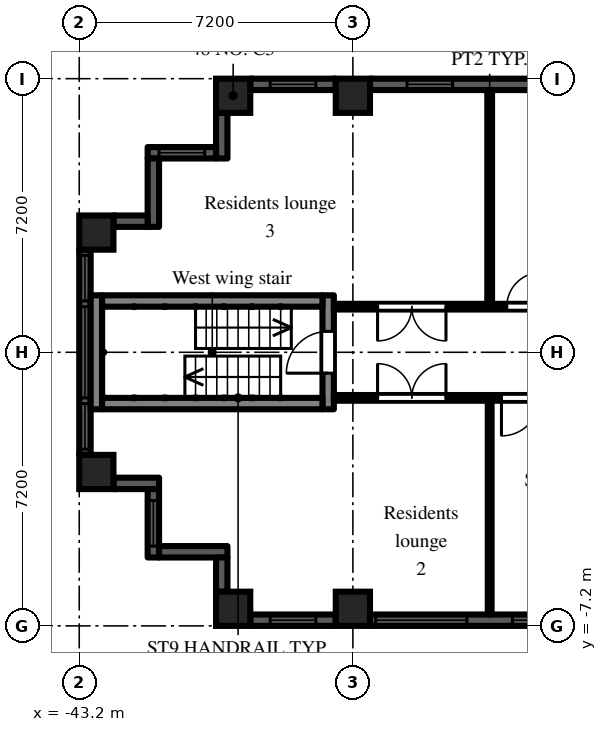
"""IFC4 building model, lengths in metres.
Left out: names, types, materials, properties, quantities, classifications, styles, units other than length and angle.
Written with IfcOpenShell. Run it as: python <this file> out.ifc"""

import sys

from ifc_helpers import new_model, si_unit, direction, frame, frame_2d, origin, origin_2d, place, context, subcontext, project, spatial, rectangle, extrude, element, fill, save


model = new_model("IFC4")
c1 = context("Model", 3, precision=1e-05, world=origin(), true_north=direction((0.0, 1.0)))
c2 = subcontext(c1, "Body", "Model", "MODEL_VIEW")
j1 = project(units=[si_unit("LENGTHUNIT", "METRE"), si_unit("PLANEANGLEUNIT", "RADIAN")], contexts=[c1])
p1 = place(None, origin())
s1 = spatial("IfcSite", under=j1, at=p1, CompositionType="ELEMENT")
p2 = place(p1, origin())
s2 = spatial("IfcBuilding", under=s1, at=p2, CompositionType="ELEMENT")
p3 = place(p2, frame((0.0, 0.0, 75.9)))
s3 = spatial("IfcBuildingStorey", under=s2, at=p3, CompositionType="ELEMENT", Elevation=75.9)
for number, where, z_axis, x_axis in (
    (1, (-42.75, -3.15, 0.0), (0.0, 0.0, 1.0), (1.0, 0.0, 0.0)),
    (2, (-42.75, 3.15, 0.0), (0.0, 0.0, 1.0), (1.0, 0.0, 0.0)),
    (3, (-39.15, -6.75, 0.0), (0.0, 0.0, 1.0), (1.0, 0.0, 0.0)),
    (4, (-39.15, 6.75, 0.0), (0.0, 0.0, 1.0), (1.0, 0.0, 0.0)),
    (5, (-36.0, -6.75, 0.0), (0.0, 0.0, 1.0), (1.0, 0.0, 0.0)),
    (6, (-36.0, 6.75, 0.0), (0.0, 0.0, 1.0), (1.0, 0.0, 0.0)),
):
    element("IfcColumn", number, at=place(p3, frame(where, z_axis=z_axis, x_axis=x_axis)), inside=s3, PredefinedType="COLUMN", context=c2, shape_type="SweptSolid", body=[
        extrude(rectangle(XDim=0.9, YDim=0.9, at=origin_2d()), origin(), (0.0, 0.0, 1.0), 3.0),
    ])
p4 = place(p3, frame((-29.25, 7.05, 0.0), z_axis=(0.0, 0.0, 1.0), x_axis=(-1.0, 0.0, 0.0)))
e7 = element("IfcWall", 7, at=p4, inside=s3, PredefinedType="SOLIDWALL", context=c2, shape_type="SweptSolid", body=[
    extrude(rectangle(XDim=6.3, YDim=0.3, at=frame_2d((3.15, 0.0))), origin(), (0.0, 0.0, 1.0), 2.1),
])
p5 = place(p4, frame((4.125, 0.0, 0.2)))
e8 = element("IfcOpeningElement", 8, at=p5, cuts=e7, PredefinedType="OPENING", context=c2, shape_type="SweptSolid", body=[
    extrude(rectangle(XDim=1.2, YDim=1.85, at=frame_2d((0.6, 0.925))), frame((0.0, 0.16, 0.0), z_axis=(0.0, -1.0, 0.0), x_axis=(1.0, 0.0, 0.0)), (0.0, 0.0, 1.0), 0.32),
])
p6 = place(p3, frame((-36.45, 7.05, 0.0), z_axis=(0.0, 0.0, 1.0), x_axis=(-1.0, 0.0, 0.0)))
e9 = element("IfcWall", 9, at=p6, inside=s3, PredefinedType="SOLIDWALL", context=c2, shape_type="SweptSolid", body=[
    extrude(rectangle(XDim=2.25, YDim=0.3, at=frame_2d((1.125, 0.0))), origin(), (0.0, 0.0, 1.0), 2.1),
])
p7 = place(p6, frame((0.525, 0.0, 0.2)))
e10 = element("IfcOpeningElement", 10, at=p7, cuts=e9, PredefinedType="OPENING", context=c2, shape_type="SweptSolid", body=[
    extrude(rectangle(XDim=1.2, YDim=1.85, at=frame_2d((0.6, 0.925))), frame((0.0, 0.16, 0.0), z_axis=(0.0, -1.0, 0.0), x_axis=(1.0, 0.0, 0.0)), (0.0, 0.0, 1.0), 0.32),
])
p8 = place(p3, frame((-39.45, 6.3, 0.0), z_axis=(0.0, 0.0, 1.0), x_axis=(0.0, -1.0, 0.0)))
e11 = element("IfcWall", 11, at=p8, inside=s3, PredefinedType="SOLIDWALL", context=c2, shape_type="SweptSolid", body=[
    extrude(rectangle(XDim=1.2, YDim=0.3, at=frame_2d((0.6, 0.0))), origin(), (0.0, 0.0, 1.0), 2.575),
])
p9 = place(p3, frame((-39.6, 5.25, 0.0), z_axis=(0.0, 0.0, 1.0), x_axis=(-1.0, 0.0, 0.0)))
e12 = element("IfcWall", 12, at=p9, inside=s3, PredefinedType="SOLIDWALL", context=c2, shape_type="SweptSolid", body=[
    extrude(rectangle(XDim=1.8, YDim=0.3, at=frame_2d((0.9, 0.0))), origin(), (0.0, 0.0, 1.0), 2.575),
])
p10 = place(p9, frame((0.3, 0.0, 0.2)))
e13 = element("IfcOpeningElement", 13, at=p10, cuts=e12, PredefinedType="OPENING", context=c2, shape_type="SweptSolid", body=[
    extrude(rectangle(XDim=1.2, YDim=1.85, at=frame_2d((0.6, 0.925))), frame((0.0, 0.16, 0.0), z_axis=(0.0, -1.0, 0.0), x_axis=(1.0, 0.0, 0.0)), (0.0, 0.0, 1.0), 0.32),
])
p11 = place(p3, frame((-41.25, 5.1, 0.0), z_axis=(0.0, 0.0, 1.0), x_axis=(0.0, -1.0, 0.0)))
e14 = element("IfcWall", 14, at=p11, inside=s3, PredefinedType="SOLIDWALL", context=c2, shape_type="SweptSolid", body=[
    extrude(rectangle(XDim=1.8, YDim=0.3, at=frame_2d((0.9, 0.0))), origin(), (0.0, 0.0, 1.0), 2.575),
])
p12 = place(p3, frame((-41.4, 3.45, 0.0), z_axis=(0.0, 0.0, 1.0), x_axis=(-1.0, 0.0, 0.0)))
e15 = element("IfcWall", 15, at=p12, inside=s3, PredefinedType="SOLIDWALL", context=c2, shape_type="SweptSolid", body=[
    extrude(rectangle(XDim=0.9, YDim=0.3, at=frame_2d((0.45, 0.0))), origin(), (0.0, 0.0, 1.0), 2.575),
])
p13 = place(p3, frame((-43.05, 2.7, 0.0), z_axis=(0.0, 0.0, 1.0), x_axis=(0.0, -1.0, 0.0)))
e16 = element("IfcWall", 16, at=p13, inside=s3, PredefinedType="SOLIDWALL", context=c2, shape_type="SweptSolid", body=[
    extrude(rectangle(XDim=5.4, YDim=0.3, at=frame_2d((2.7, 0.0))), origin(), (0.0, 0.0, 1.0), 2.1),
])
p14 = place(p13, frame((1.5, 0.0, 0.2)))
e17 = element("IfcOpeningElement", 17, at=p14, cuts=e16, PredefinedType="OPENING", context=c2, shape_type="SweptSolid", body=[
    extrude(rectangle(XDim=2.4, YDim=1.85, at=frame_2d((1.2, 0.925))), frame((0.0, 0.16, 0.0), z_axis=(0.0, -1.0, 0.0), x_axis=(1.0, 0.0, 0.0)), (0.0, 0.0, 1.0), 0.32),
])
p15 = place(p13, frame((0.15, 0.0, 0.2)))
e18 = element("IfcOpeningElement", 18, at=p15, cuts=e16, PredefinedType="OPENING", context=c2, shape_type="SweptSolid", body=[
    extrude(rectangle(XDim=1.2, YDim=1.85, at=frame_2d((0.6, 0.925))), frame((0.0, 0.16, 0.0), z_axis=(0.0, -1.0, 0.0), x_axis=(1.0, 0.0, 0.0)), (0.0, 0.0, 1.0), 0.32),
])
p16 = place(p13, frame((4.05, 0.0, 0.2)))
e19 = element("IfcOpeningElement", 19, at=p16, cuts=e16, PredefinedType="OPENING", context=c2, shape_type="SweptSolid", body=[
    extrude(rectangle(XDim=1.2, YDim=1.85, at=frame_2d((0.6, 0.925))), frame((0.0, 0.16, 0.0), z_axis=(0.0, -1.0, 0.0), x_axis=(1.0, 0.0, 0.0)), (0.0, 0.0, 1.0), 0.32),
])
p17 = place(p3, frame((-42.3, -3.45, 0.0), z_axis=(0.0, 0.0, 1.0), x_axis=(1.0, 0.0, 0.0)))
e20 = element("IfcWall", 20, at=p17, inside=s3, PredefinedType="SOLIDWALL", context=c2, shape_type="SweptSolid", body=[
    extrude(rectangle(XDim=1.2, YDim=0.3, at=frame_2d((0.6, 0.0))), origin(), (0.0, 0.0, 1.0), 2.575),
])
p18 = place(p3, frame((-41.25, -3.6, 0.0), z_axis=(0.0, 0.0, 1.0), x_axis=(0.0, -1.0, 0.0)))
e21 = element("IfcWall", 21, at=p18, inside=s3, PredefinedType="SOLIDWALL", context=c2, shape_type="SweptSolid", body=[
    extrude(rectangle(XDim=1.8, YDim=0.3, at=frame_2d((0.9, 0.0))), origin(), (0.0, 0.0, 1.0), 2.575),
])
p19 = place(p18, frame((0.3, 0.0, 0.2)))
e22 = element("IfcOpeningElement", 22, at=p19, cuts=e21, PredefinedType="OPENING", context=c2, shape_type="SweptSolid", body=[
    extrude(rectangle(XDim=1.2, YDim=1.85, at=frame_2d((0.6, 0.925))), frame((0.0, 0.16, 0.0), z_axis=(0.0, -1.0, 0.0), x_axis=(1.0, 0.0, 0.0)), (0.0, 0.0, 1.0), 0.32),
])
p20 = place(p3, frame((-41.1, -5.25, 0.0), z_axis=(0.0, 0.0, 1.0), x_axis=(1.0, 0.0, 0.0)))
e23 = element("IfcWall", 23, at=p20, inside=s3, PredefinedType="SOLIDWALL", context=c2, shape_type="SweptSolid", body=[
    extrude(rectangle(XDim=1.8, YDim=0.3, at=frame_2d((0.9, 0.0))), origin(), (0.0, 0.0, 1.0), 2.575),
])
p21 = place(p3, frame((-39.45, -5.4, 0.0), z_axis=(0.0, 0.0, 1.0), x_axis=(0.0, -1.0, 0.0)))
e24 = element("IfcWall", 24, at=p21, inside=s3, PredefinedType="SOLIDWALL", context=c2, shape_type="SweptSolid", body=[
    extrude(rectangle(XDim=0.9, YDim=0.3, at=frame_2d((0.45, 0.0))), origin(), (0.0, 0.0, 1.0), 2.575),
])
p22 = place(p3, frame((-38.7, -7.05, 0.0), z_axis=(0.0, 0.0, 1.0), x_axis=(1.0, 0.0, 0.0)))
e25 = element("IfcWall", 25, at=p22, inside=s3, PredefinedType="SOLIDWALL", context=c2, shape_type="SweptSolid", body=[
    extrude(rectangle(XDim=2.25, YDim=0.3, at=frame_2d((1.125, 0.0))), origin(), (0.0, 0.0, 1.0), 2.1),
])
p23 = place(p22, frame((0.525, 0.0, 0.2)))
e26 = element("IfcOpeningElement", 26, at=p23, cuts=e25, PredefinedType="OPENING", context=c2, shape_type="SweptSolid", body=[
    extrude(rectangle(XDim=1.2, YDim=1.85, at=frame_2d((0.6, 0.925))), frame((0.0, 0.16, 0.0), z_axis=(0.0, -1.0, 0.0), x_axis=(1.0, 0.0, 0.0)), (0.0, 0.0, 1.0), 0.32),
])
p24 = place(p3, frame((-35.55, -7.05, 0.0), z_axis=(0.0, 0.0, 1.0), x_axis=(1.0, 0.0, 0.0)))
e27 = element("IfcWall", 27, at=p24, inside=s3, PredefinedType="SOLIDWALL", context=c2, shape_type="SweptSolid", body=[
    extrude(rectangle(XDim=6.3, YDim=0.3, at=frame_2d((3.15, 0.0))), origin(), (0.0, 0.0, 1.0), 2.1),
])
p25 = place(p24, frame((0.15, 0.0, 0.2)))
e28 = element("IfcOpeningElement", 28, at=p25, cuts=e27, PredefinedType="OPENING", context=c2, shape_type="SweptSolid", body=[
    extrude(rectangle(XDim=2.4, YDim=1.85, at=frame_2d((1.2, 0.925))), frame((0.0, 0.16, 0.0), z_axis=(0.0, -1.0, 0.0), x_axis=(1.0, 0.0, 0.0)), (0.0, 0.0, 1.0), 0.32),
])
p26 = place(p24, frame((3.75, 0.0, 0.2)))
e29 = element("IfcOpeningElement", 29, at=p26, cuts=e27, PredefinedType="OPENING", context=c2, shape_type="SweptSolid", body=[
    extrude(rectangle(XDim=2.4, YDim=1.85, at=frame_2d((1.2, 0.925))), frame((0.0, 0.16, 0.0), z_axis=(0.0, -1.0, 0.0), x_axis=(1.0, 0.0, 0.0)), (0.0, 0.0, 1.0), 0.32),
])
p27 = place(p3, frame((-36.65, -1.5, 0.0), z_axis=(0.0, 0.0, 1.0), x_axis=(0.0, 1.0, 0.0)))
e30 = element("IfcWall", 30, at=p27, inside=s3, PredefinedType="SHEAR", context=c2, shape_type="SweptSolid", body=[
    extrude(rectangle(XDim=3.0, YDim=0.3, at=frame_2d((1.5, 0.0))), origin(), (0.0, 0.0, 1.0), 2.575),
])
p28 = place(p27, frame((0.95, 0.0, 0.0)))
e31 = element("IfcOpeningElement", 31, at=p28, cuts=e30, PredefinedType="OPENING", context=c2, shape_type="SweptSolid", body=[
    extrude(rectangle(XDim=1.1, YDim=2.1, at=frame_2d((0.55, 1.05))), frame((0.0, 0.16, 0.0), z_axis=(0.0, -1.0, 0.0), x_axis=(1.0, 0.0, 0.0)), (0.0, 0.0, 1.0), 0.32),
])
p29 = place(p3, frame((-42.75, -1.5, 0.0), z_axis=(0.0, 0.0, 1.0), x_axis=(0.0, 1.0, 0.0)))
e32 = element("IfcWall", 32, at=p29, inside=s3, PredefinedType="SHEAR", context=c2, shape_type="SweptSolid", body=[
    extrude(rectangle(XDim=3.0, YDim=0.3, at=frame_2d((1.5, 0.0))), origin(), (0.0, 0.0, 1.0), 2.575),
])
for number, where, z_axis, x_axis in (
    (33, (-36.8, -1.35, 0.0), (0.0, 0.0, 1.0), (-1.0, 0.0, 0.0)),
    (34, (-36.8, 1.35, 0.0), (0.0, 0.0, 1.0), (-1.0, 0.0, 0.0)),
):
    element("IfcWall", number, at=place(p3, frame(where, z_axis=z_axis, x_axis=x_axis)), inside=s3, PredefinedType="SHEAR", context=c2, shape_type="SweptSolid", body=[
        extrude(rectangle(XDim=5.8, YDim=0.3, at=frame_2d((2.9, 0.0))), origin(), (0.0, 0.0, 1.0), 2.575),
    ])
p30 = place(p3, frame((-36.5, -1.2, 0.0), z_axis=(0.0, 0.0, 1.0), x_axis=(1.0, 0.0, 0.0)))
e35 = element("IfcWall", 35, at=p30, inside=s3, PredefinedType="PARTITIONING", context=c2, shape_type="SweptSolid", body=[
    extrude(rectangle(XDim=14.9, YDim=0.15, at=frame_2d((7.45, 0.0))), origin(), (0.0, 0.0, 1.0), 2.575),
])
p31 = place(p30, frame((13.55, 0.0, 0.0)))
e36 = element("IfcOpeningElement", 36, at=p31, cuts=e35, PredefinedType="OPENING", context=c2, shape_type="SweptSolid", body=[
    extrude(rectangle(XDim=0.9, YDim=2.1, at=frame_2d((0.45, 1.05))), frame((0.0, 0.085, 0.0), z_axis=(0.0, -1.0, 0.0), x_axis=(1.0, 0.0, 0.0)), (0.0, 0.0, 1.0), 0.17),
])
p32 = place(p30, frame((11.75, 0.0, 0.0)))
e37 = element("IfcOpeningElement", 37, at=p32, cuts=e35, PredefinedType="OPENING", context=c2, shape_type="SweptSolid", body=[
    extrude(rectangle(XDim=0.9, YDim=2.1, at=frame_2d((0.45, 1.05))), frame((0.0, 0.085, 0.0), z_axis=(0.0, -1.0, 0.0), x_axis=(1.0, 0.0, 0.0)), (0.0, 0.0, 1.0), 0.17),
])
p33 = place(p30, frame((4.41, 0.0, 0.0)))
e38 = element("IfcOpeningElement", 38, at=p33, cuts=e35, PredefinedType="OPENING", context=c2, shape_type="SweptSolid", body=[
    extrude(rectangle(XDim=1.0, YDim=2.1, at=frame_2d((0.5, 1.05))), frame((0.0, 0.085, 0.0), z_axis=(0.0, -1.0, 0.0), x_axis=(1.0, 0.0, 0.0)), (0.0, 0.0, 1.0), 0.17),
])
p34 = place(p30, frame((1.15, 0.0, 0.0)))
e39 = element("IfcOpeningElement", 39, at=p34, cuts=e35, PredefinedType="OPENING", context=c2, shape_type="SweptSolid", body=[
    extrude(rectangle(XDim=1.8, YDim=2.1, at=frame_2d((0.9, 1.05))), frame((0.0, 0.085, 0.0), z_axis=(0.0, -1.0, 0.0), x_axis=(1.0, 0.0, 0.0)), (0.0, 0.0, 1.0), 0.17),
])
p35 = place(p3, frame((-36.5, 1.2, 0.0), z_axis=(0.0, 0.0, 1.0), x_axis=(1.0, 0.0, 0.0)))
e40 = element("IfcWall", 40, at=p35, inside=s3, PredefinedType="PARTITIONING", context=c2, shape_type="SweptSolid", body=[
    extrude(rectangle(XDim=14.9, YDim=0.15, at=frame_2d((7.45, 0.0))), origin(), (0.0, 0.0, 1.0), 2.575),
])
p36 = place(p35, frame((10.4, 0.0, 0.0)))
e41 = element("IfcOpeningElement", 41, at=p36, cuts=e40, PredefinedType="OPENING", context=c2, shape_type="SweptSolid", body=[
    extrude(rectangle(XDim=1.8, YDim=2.1, at=frame_2d((0.9, 1.05))), frame((0.0, 0.085, 0.0), z_axis=(0.0, -1.0, 0.0), x_axis=(1.0, 0.0, 0.0)), (0.0, 0.0, 1.0), 0.17),
])
p37 = place(p35, frame((6.35, 0.0, 0.0)))
e42 = element("IfcOpeningElement", 42, at=p37, cuts=e40, PredefinedType="OPENING", context=c2, shape_type="SweptSolid", body=[
    extrude(rectangle(XDim=0.9, YDim=2.1, at=frame_2d((0.45, 1.05))), frame((0.0, 0.085, 0.0), z_axis=(0.0, -1.0, 0.0), x_axis=(1.0, 0.0, 0.0)), (0.0, 0.0, 1.0), 0.17),
])
p38 = place(p35, frame((4.55, 0.0, 0.0)))
e43 = element("IfcOpeningElement", 43, at=p38, cuts=e40, PredefinedType="OPENING", context=c2, shape_type="SweptSolid", body=[
    extrude(rectangle(XDim=0.9, YDim=2.1, at=frame_2d((0.45, 1.05))), frame((0.0, 0.085, 0.0), z_axis=(0.0, -1.0, 0.0), x_axis=(1.0, 0.0, 0.0)), (0.0, 0.0, 1.0), 0.17),
])
p39 = place(p35, frame((1.15, 0.0, 0.0)))
e44 = element("IfcOpeningElement", 44, at=p39, cuts=e40, PredefinedType="OPENING", context=c2, shape_type="SweptSolid", body=[
    extrude(rectangle(XDim=1.8, YDim=2.1, at=frame_2d((0.9, 1.05))), frame((0.0, 0.085, 0.0), z_axis=(0.0, -1.0, 0.0), x_axis=(1.0, 0.0, 0.0)), (0.0, 0.0, 1.0), 0.17),
])
p40 = place(p3, frame((-32.4, -6.9, 0.0), z_axis=(0.0, 0.0, 1.0), x_axis=(0.0, 1.0, 0.0)))
e45 = element("IfcWall", 45, at=p40, inside=s3, PredefinedType="PARTITIONING", context=c2, shape_type="SweptSolid", body=[
    extrude(rectangle(XDim=5.625, YDim=0.1, at=frame_2d((2.812, 0.0))), origin(), (0.0, 0.0, 1.0), 2.575),
])
p41 = place(p3, frame((-32.4, 1.275, 0.0), z_axis=(0.0, 0.0, 1.0), x_axis=(0.0, 1.0, 0.0)))
e46 = element("IfcWall", 46, at=p41, inside=s3, PredefinedType="PARTITIONING", context=c2, shape_type="SweptSolid", body=[
    extrude(rectangle(XDim=5.625, YDim=0.125, at=frame_2d((2.812, 0.0))), origin(), (0.0, 0.0, 1.0), 2.575),
])
p42 = place(p5, origin())
e47 = element("IfcWindow", 47, at=p42, inside=s3, PartitioningType="SINGLE_PANEL", PredefinedType="WINDOW", context=c2, shape_type="SweptSolid", body=[
    extrude(rectangle(XDim=1.2, YDim=1.85, at=frame_2d((0.6, 0.925))), frame((0.0, 0.03, 0.0), z_axis=(0.0, -1.0, 0.0), x_axis=(1.0, 0.0, 0.0)), (0.0, 0.0, 1.0), 0.06),
])
fill(e8, e47)
p43 = place(p7, origin())
e48 = element("IfcWindow", 48, at=p43, inside=s3, PartitioningType="SINGLE_PANEL", PredefinedType="WINDOW", context=c2, shape_type="SweptSolid", body=[
    extrude(rectangle(XDim=1.2, YDim=1.85, at=frame_2d((0.6, 0.925))), frame((0.0, 0.03, 0.0), z_axis=(0.0, -1.0, 0.0), x_axis=(1.0, 0.0, 0.0)), (0.0, 0.0, 1.0), 0.06),
])
fill(e10, e48)
p44 = place(p10, origin())
e49 = element("IfcWindow", 49, at=p44, inside=s3, PartitioningType="SINGLE_PANEL", PredefinedType="WINDOW", context=c2, shape_type="SweptSolid", body=[
    extrude(rectangle(XDim=1.2, YDim=1.85, at=frame_2d((0.6, 0.925))), frame((0.0, 0.03, 0.0), z_axis=(0.0, -1.0, 0.0), x_axis=(1.0, 0.0, 0.0)), (0.0, 0.0, 1.0), 0.06),
])
fill(e13, e49)
p45 = place(p14, origin())
e50 = element("IfcWindow", 50, at=p45, inside=s3, PartitioningType="SINGLE_PANEL", PredefinedType="WINDOW", context=c2, shape_type="SweptSolid", body=[
    extrude(rectangle(XDim=2.4, YDim=1.85, at=frame_2d((1.2, 0.925))), frame((0.0, 0.03, 0.0), z_axis=(0.0, -1.0, 0.0), x_axis=(1.0, 0.0, 0.0)), (0.0, 0.0, 1.0), 0.06),
])
fill(e17, e50)
p46 = place(p15, origin())
e51 = element("IfcWindow", 51, at=p46, inside=s3, PartitioningType="SINGLE_PANEL", PredefinedType="WINDOW", context=c2, shape_type="SweptSolid", body=[
    extrude(rectangle(XDim=1.2, YDim=1.85, at=frame_2d((0.6, 0.925))), frame((0.0, 0.03, 0.0), z_axis=(0.0, -1.0, 0.0), x_axis=(1.0, 0.0, 0.0)), (0.0, 0.0, 1.0), 0.06),
])
fill(e18, e51)
p47 = place(p16, origin())
e52 = element("IfcWindow", 52, at=p47, inside=s3, PartitioningType="SINGLE_PANEL", PredefinedType="WINDOW", context=c2, shape_type="SweptSolid", body=[
    extrude(rectangle(XDim=1.2, YDim=1.85, at=frame_2d((0.6, 0.925))), frame((0.0, 0.03, 0.0), z_axis=(0.0, -1.0, 0.0), x_axis=(1.0, 0.0, 0.0)), (0.0, 0.0, 1.0), 0.06),
])
fill(e19, e52)
p48 = place(p19, origin())
e53 = element("IfcWindow", 53, at=p48, inside=s3, PartitioningType="SINGLE_PANEL", PredefinedType="WINDOW", context=c2, shape_type="SweptSolid", body=[
    extrude(rectangle(XDim=1.2, YDim=1.85, at=frame_2d((0.6, 0.925))), frame((0.0, 0.03, 0.0), z_axis=(0.0, -1.0, 0.0), x_axis=(1.0, 0.0, 0.0)), (0.0, 0.0, 1.0), 0.06),
])
fill(e22, e53)
p49 = place(p23, origin())
e54 = element("IfcWindow", 54, at=p49, inside=s3, PartitioningType="SINGLE_PANEL", PredefinedType="WINDOW", context=c2, shape_type="SweptSolid", body=[
    extrude(rectangle(XDim=1.2, YDim=1.85, at=frame_2d((0.6, 0.925))), frame((0.0, 0.03, 0.0), z_axis=(0.0, -1.0, 0.0), x_axis=(1.0, 0.0, 0.0)), (0.0, 0.0, 1.0), 0.06),
])
fill(e26, e54)
p50 = place(p25, origin())
e55 = element("IfcWindow", 55, at=p50, inside=s3, PartitioningType="SINGLE_PANEL", PredefinedType="WINDOW", context=c2, shape_type="SweptSolid", body=[
    extrude(rectangle(XDim=2.4, YDim=1.85, at=frame_2d((1.2, 0.925))), frame((0.0, 0.03, 0.0), z_axis=(0.0, -1.0, 0.0), x_axis=(1.0, 0.0, 0.0)), (0.0, 0.0, 1.0), 0.06),
])
fill(e28, e55)
p51 = place(p26, origin())
e56 = element("IfcWindow", 56, at=p51, inside=s3, PartitioningType="SINGLE_PANEL", PredefinedType="WINDOW", context=c2, shape_type="SweptSolid", body=[
    extrude(rectangle(XDim=2.4, YDim=1.85, at=frame_2d((1.2, 0.925))), frame((0.0, 0.03, 0.0), z_axis=(0.0, -1.0, 0.0), x_axis=(1.0, 0.0, 0.0)), (0.0, 0.0, 1.0), 0.06),
])
fill(e29, e56)
p52 = place(p28, origin())
e57 = element("IfcDoor", 57, at=p52, inside=s3, OperationType="SINGLE_SWING_LEFT", PredefinedType="DOOR", context=c2, shape_type="SweptSolid", body=[
    extrude(rectangle(XDim=1.1, YDim=2.1, at=frame_2d((0.55, 1.05))), frame((0.0, 0.025, 0.0), z_axis=(0.0, -1.0, 0.0), x_axis=(1.0, 0.0, 0.0)), (0.0, 0.0, 1.0), 0.05),
])
fill(e31, e57)
p53 = place(p33, frame((1.0, 0.0, 0.0), z_axis=(0.0, 0.0, 1.0), x_axis=(-1.0, 0.0, 0.0)))
e58 = element("IfcDoor", 58, at=p53, inside=s3, OperationType="SINGLE_SWING_RIGHT", PredefinedType="DOOR", context=c2, shape_type="SweptSolid", body=[
    extrude(rectangle(XDim=1.0, YDim=2.1, at=frame_2d((0.5, 1.05))), frame((0.0, 0.025, 0.0), z_axis=(0.0, -1.0, 0.0), x_axis=(1.0, 0.0, 0.0)), (0.0, 0.0, 1.0), 0.05),
])
fill(e38, e58)
p54 = place(p34, origin())
e59 = element("IfcDoor", 59, at=p54, inside=s3, OperationType="DOUBLE_DOOR_DOUBLE_SWING", PredefinedType="DOOR", context=c2, shape_type="SweptSolid", body=[
    extrude(rectangle(XDim=1.8, YDim=2.1, at=frame_2d((0.9, 1.05))), frame((0.0, 0.025, 0.0), z_axis=(0.0, -1.0, 0.0), x_axis=(1.0, 0.0, 0.0)), (0.0, 0.0, 1.0), 0.05),
])
fill(e39, e59)
p55 = place(p38, origin())
e60 = element("IfcDoor", 60, at=p55, inside=s3, OperationType="SINGLE_SWING_RIGHT", PredefinedType="DOOR", context=c2, shape_type="SweptSolid", body=[
    extrude(rectangle(XDim=0.9, YDim=2.1, at=frame_2d((0.45, 1.05))), frame((0.0, 0.025, 0.0), z_axis=(0.0, -1.0, 0.0), x_axis=(1.0, 0.0, 0.0)), (0.0, 0.0, 1.0), 0.05),
])
fill(e43, e60)
p56 = place(p39, frame((1.8, 0.0, 0.0), z_axis=(0.0, 0.0, 1.0), x_axis=(-1.0, 0.0, 0.0)))
e61 = element("IfcDoor", 61, at=p56, inside=s3, OperationType="DOUBLE_DOOR_DOUBLE_SWING", PredefinedType="DOOR", context=c2, shape_type="SweptSolid", body=[
    extrude(rectangle(XDim=1.8, YDim=2.1, at=frame_2d((0.9, 1.05))), frame((0.0, 0.025, 0.0), z_axis=(0.0, -1.0, 0.0), x_axis=(1.0, 0.0, 0.0)), (0.0, 0.0, 1.0), 0.05),
])
fill(e44, e61)
save(model, sys.argv[1])
